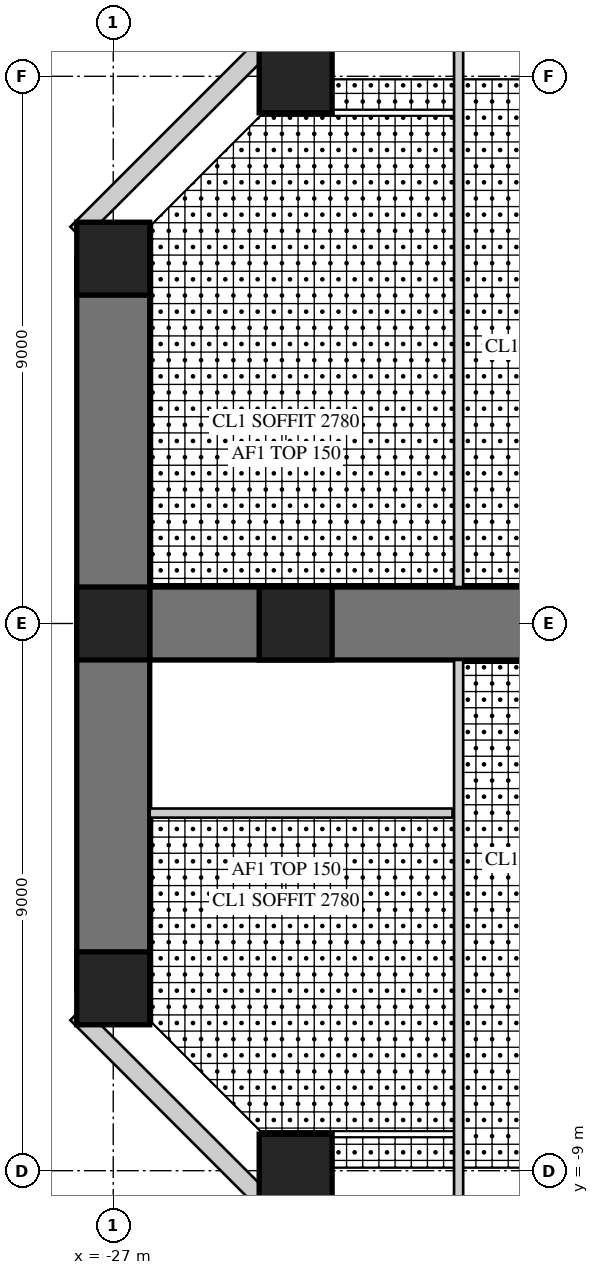
"""IFC4 building model, lengths in metres.
Left out: names, types, materials, properties, quantities, classifications, styles, units other than length and angle.
Written with IfcOpenShell. Run it as: python <this file> out.ifc"""

import sys

from ifc_helpers import new_model, si_unit, direction, frame, frame_2d, origin, origin_2d, place, context, subcontext, project, spatial, rectangle, hollow_rectangle, extrude, element, fill, save


model = new_model("IFC4")
c1 = context("Model", 3, precision=1e-05, world=origin(), true_north=direction((0.0, 1.0)))
c2 = subcontext(c1, "Body", "Model", "MODEL_VIEW")
j1 = project(units=[si_unit("LENGTHUNIT", "METRE"), si_unit("PLANEANGLEUNIT", "RADIAN")], contexts=[c1])
p1 = place(None, origin())
s1 = spatial("IfcSite", under=j1, at=p1, CompositionType="ELEMENT")
p2 = place(p1, origin())
s2 = spatial("IfcBuilding", under=s1, at=p2, CompositionType="ELEMENT")
p3 = place(p2, frame((0.0, 0.0, 47.5)))
s3 = spatial("IfcBuildingStorey", under=s2, at=p3, CompositionType="ELEMENT", Elevation=47.5)
p4 = place(p3, frame((-9.0, 0.0, 0.0), z_axis=(0.0, 0.0, 1.0), x_axis=(-1.0, 0.0, 0.0)))
e1 = element("IfcWall", 1, at=p4, inside=s3, PredefinedType="SHEAR", context=c2, shape_type="SweptSolid", body=[
    extrude(rectangle(XDim=18.0, YDim=1.2, at=frame_2d((9.0, 0.0))), origin(), (0.0, 0.0, 1.0), 4.0),
])
p5 = place(p4, frame((9.9, 0.0, 0.0)))
e2 = element("IfcOpeningElement", 2, at=p5, cuts=e1, PredefinedType="OPENING", context=c2, shape_type="SweptSolid", body=[
    extrude(rectangle(XDim=1.0, YDim=2.2, at=frame_2d((0.5, 1.1))), frame((0.0, 0.61, 0.0), z_axis=(0.0, -1.0, 0.0), x_axis=(1.0, 0.0, 0.0)), (0.0, 0.0, 1.0), 1.22),
])
p6 = place(p3, frame((-27.0, 6.0, 0.0), z_axis=(0.0, 0.0, 1.0), x_axis=(0.0, -1.0, 0.0)))
e3 = element("IfcWall", 3, at=p6, inside=s3, PredefinedType="SHEAR", context=c2, shape_type="SweptSolid", body=[
    extrude(rectangle(XDim=12.0, YDim=1.2, at=frame_2d((6.0, 0.0))), origin(), (0.0, 0.0, 1.0), 4.0),
])
p7 = place(p6, frame((1.6, 0.0, 0.6)))
e4 = element("IfcOpeningElement", 4, at=p7, cuts=e3, PredefinedType="OPENING", context=c2, shape_type="SweptSolid", body=[
    extrude(rectangle(XDim=3.0, YDim=2.4, at=frame_2d((1.5, 1.2))), frame((0.0, 0.61, 0.0), z_axis=(0.0, -1.0, 0.0), x_axis=(1.0, 0.0, 0.0)), (0.0, 0.0, 1.0), 1.22),
])
p8 = place(p6, frame((7.4, 0.0, 0.6)))
e5 = element("IfcOpeningElement", 5, at=p8, cuts=e3, PredefinedType="OPENING", context=c2, shape_type="SweptSolid", body=[
    extrude(rectangle(XDim=3.0, YDim=2.4, at=frame_2d((1.5, 1.2))), frame((0.0, 0.61, 0.0), z_axis=(0.0, -1.0, 0.0), x_axis=(1.0, 0.0, 0.0)), (0.0, 0.0, 1.0), 1.22),
])
for number, where, z_axis, x_axis in (
    (6, (-24.0, 9.0, 0.0), (0.0, 0.0, 1.0), (1.0, 0.0, 0.0)),
    (7, (-24.0, -9.0, 0.0), (0.0, 0.0, 1.0), (1.0, 0.0, 0.0)),
    (8, (-27.0, 6.0, 0.0), (0.0, 0.0, 1.0), (1.0, 0.0, 0.0)),
    (9, (-27.0, 0.0, 0.0), (0.0, 0.0, 1.0), (1.0, 0.0, 0.0)),
    (10, (-27.0, -6.0, 0.0), (0.0, 0.0, 1.0), (1.0, 0.0, 0.0)),
    (11, (-24.0, 0.0, 0.0), (0.0, 0.0, 1.0), (1.0, 0.0, 0.0)),
):
    element("IfcColumn", number, at=place(p3, frame(where, z_axis=z_axis, x_axis=x_axis)), inside=s3, PredefinedType="COLUMN", context=c2, shape_type="SweptSolid", body=[
        extrude(rectangle(XDim=1.2, YDim=1.2, at=origin_2d()), origin(), (0.0, 0.0, 1.0), 4.0),
    ])
p9 = place(p3, frame((-24.298, 9.72, 0.0), z_axis=(0.0, 0.0, 1.0), x_axis=(-0.707106781187, -0.707106781187, 0.0)))
e12 = element("IfcWall", 12, at=p9, inside=s3, PredefinedType="SOLIDWALL", context=c2, shape_type="SweptSolid", body=[
    extrude(rectangle(XDim=4.669, YDim=0.3, at=frame_2d((2.335, 0.0))), origin(), (0.0, 0.0, 1.0), 3.8),
])
p10 = place(p9, frame((1.885, 0.0, 0.3)))
e13 = element("IfcOpeningElement", 13, at=p10, cuts=e12, PredefinedType="OPENING", context=c2, shape_type="SweptSolid", body=[
    extrude(rectangle(XDim=0.9, YDim=2.4, at=frame_2d((0.45, 1.2))), frame((0.0, 0.16, 0.0), z_axis=(0.0, -1.0, 0.0), x_axis=(1.0, 0.0, 0.0)), (0.0, 0.0, 1.0), 0.32),
])
p11 = place(p3, frame((-27.6, -6.418, 0.0), z_axis=(0.0, 0.0, 1.0), x_axis=(0.707106781187, -0.707106781187, 0.0)))
e14 = element("IfcWall", 14, at=p11, inside=s3, PredefinedType="SOLIDWALL", context=c2, shape_type="SweptSolid", body=[
    extrude(rectangle(XDim=4.669, YDim=0.3, at=frame_2d((2.335, 0.0))), origin(), (0.0, 0.0, 1.0), 3.8),
])
p12 = place(p11, frame((1.885, 0.0, 0.3)))
e15 = element("IfcOpeningElement", 15, at=p12, cuts=e14, PredefinedType="OPENING", context=c2, shape_type="SweptSolid", body=[
    extrude(rectangle(XDim=0.9, YDim=2.4, at=frame_2d((0.45, 1.2))), frame((0.0, 0.16, 0.0), z_axis=(0.0, -1.0, 0.0), x_axis=(1.0, 0.0, 0.0)), (0.0, 0.0, 1.0), 0.32),
])
p13 = place(p3, frame((-21.42, -3.118, 0.0), z_axis=(0.0, 0.0, 1.0), x_axis=(-1.0, 0.0, 0.0)))
e16 = element("IfcWall", 16, at=p13, inside=s3, PredefinedType="PARTITIONING", context=c2, shape_type="SweptSolid", body=[
    extrude(rectangle(XDim=4.98, YDim=0.15, at=frame_2d((2.49, 0.0))), origin(), (0.0, 0.0, 1.0), 3.8),
])
p14 = place(p3, frame((-21.32, -0.6, 0.0), z_axis=(0.0, 0.0, 1.0), x_axis=(0.0, -1.0, 0.0)))
e17 = element("IfcWall", 17, at=p14, inside=s3, PredefinedType="PARTITIONING", context=c2, shape_type="SweptSolid", body=[
    extrude(rectangle(XDim=9.08, YDim=0.15, at=frame_2d((4.54, 0.0))), origin(), (0.0, 0.0, 1.0), 3.8),
])
p15 = place(p14, frame((0.35, 0.0, 0.0)))
e18 = element("IfcOpeningElement", 18, at=p15, cuts=e17, PredefinedType="OPENING", context=c2, shape_type="SweptSolid", body=[
    extrude(rectangle(XDim=1.0, YDim=2.2, at=frame_2d((0.5, 1.1))), frame((0.0, 0.085, 0.0), z_axis=(0.0, -1.0, 0.0), x_axis=(1.0, 0.0, 0.0)), (0.0, 0.0, 1.0), 0.17),
])
p16 = place(p14, frame((2.993, 0.0, 0.0)))
e19 = element("IfcOpeningElement", 19, at=p16, cuts=e17, PredefinedType="OPENING", context=c2, shape_type="SweptSolid", body=[
    extrude(rectangle(XDim=1.0, YDim=2.2, at=frame_2d((0.5, 1.1))), frame((0.0, 0.085, 0.0), z_axis=(0.0, -1.0, 0.0), x_axis=(1.0, 0.0, 0.0)), (0.0, 0.0, 1.0), 0.17),
])
p17 = place(p3, frame((-21.32, 9.68, 0.0), z_axis=(0.0, 0.0, 1.0), x_axis=(0.0, -1.0, 0.0)))
e20 = element("IfcWall", 20, at=p17, inside=s3, PredefinedType="PARTITIONING", context=c2, shape_type="SweptSolid", body=[
    extrude(rectangle(XDim=9.08, YDim=0.15, at=frame_2d((4.54, 0.0))), origin(), (0.0, 0.0, 1.0), 3.8),
])
p18 = place(p17, frame((7.63, 0.0, 0.0)))
e21 = element("IfcOpeningElement", 21, at=p18, cuts=e20, PredefinedType="OPENING", context=c2, shape_type="SweptSolid", body=[
    extrude(rectangle(XDim=1.0, YDim=2.2, at=frame_2d((0.5, 1.1))), frame((0.0, 0.085, 0.0), z_axis=(0.0, -1.0, 0.0), x_axis=(1.0, 0.0, 0.0)), (0.0, 0.0, 1.0), 0.17),
])
p19 = place(p10, origin())
e22 = element("IfcWindow", 22, at=p19, inside=s3, PartitioningType="SINGLE_PANEL", PredefinedType="WINDOW", context=c2, shape_type="SweptSolid", body=[
    extrude(hollow_rectangle(XDim=0.9, YDim=2.4, WallThickness=0.06, at=frame_2d((0.45, 1.2))), frame((0.0, 0.03, 0.0), z_axis=(0.0, -1.0, 0.0), x_axis=(1.0, 0.0, 0.0)), (0.0, 0.0, 1.0), 0.06),
    extrude(rectangle(XDim=0.779, YDim=2.279, at=frame_2d((0.45, 1.2))), frame((0.0, 0.03, 0.0), z_axis=(0.0, -1.0, 0.0), x_axis=(1.0, 0.0, 0.0)), (0.0, 0.0, 1.0), 0.06),
])
fill(e13, e22)
p20 = place(p7, origin())
e23 = element("IfcWindow", 23, at=p20, inside=s3, PartitioningType="SINGLE_PANEL", PredefinedType="WINDOW", context=c2, shape_type="SweptSolid", body=[
    extrude(hollow_rectangle(XDim=3.0, YDim=2.4, WallThickness=0.06, at=frame_2d((1.5, 1.2))), frame((0.0, 0.03, 0.0), z_axis=(0.0, -1.0, 0.0), x_axis=(1.0, 0.0, 0.0)), (0.0, 0.0, 1.0), 0.06),
    extrude(rectangle(XDim=2.879, YDim=2.279, at=frame_2d((1.5, 1.2))), frame((0.0, 0.03, 0.0), z_axis=(0.0, -1.0, 0.0), x_axis=(1.0, 0.0, 0.0)), (0.0, 0.0, 1.0), 0.06),
])
fill(e4, e23)
p21 = place(p8, origin())
e24 = element("IfcWindow", 24, at=p21, inside=s3, PartitioningType="SINGLE_PANEL", PredefinedType="WINDOW", context=c2, shape_type="SweptSolid", body=[
    extrude(hollow_rectangle(XDim=3.0, YDim=2.4, WallThickness=0.06, at=frame_2d((1.5, 1.2))), frame((0.0, 0.03, 0.0), z_axis=(0.0, -1.0, 0.0), x_axis=(1.0, 0.0, 0.0)), (0.0, 0.0, 1.0), 0.06),
    extrude(rectangle(XDim=2.879, YDim=2.279, at=frame_2d((1.5, 1.2))), frame((0.0, 0.03, 0.0), z_axis=(0.0, -1.0, 0.0), x_axis=(1.0, 0.0, 0.0)), (0.0, 0.0, 1.0), 0.06),
])
fill(e5, e24)
p22 = place(p12, origin())
e25 = element("IfcWindow", 25, at=p22, inside=s3, PartitioningType="SINGLE_PANEL", PredefinedType="WINDOW", context=c2, shape_type="SweptSolid", body=[
    extrude(hollow_rectangle(XDim=0.9, YDim=2.4, WallThickness=0.06, at=frame_2d((0.45, 1.2))), frame((0.0, 0.03, 0.0), z_axis=(0.0, -1.0, 0.0), x_axis=(1.0, 0.0, 0.0)), (0.0, 0.0, 1.0), 0.06),
    extrude(rectangle(XDim=0.779, YDim=2.279, at=frame_2d((0.45, 1.2))), frame((0.0, 0.03, 0.0), z_axis=(0.0, -1.0, 0.0), x_axis=(1.0, 0.0, 0.0)), (0.0, 0.0, 1.0), 0.06),
])
fill(e15, e25)
p23 = place(p15, frame((1.0, 0.0, 0.0), z_axis=(0.0, 0.0, 1.0), x_axis=(-1.0, 0.0, 0.0)))
e26 = element("IfcDoor", 26, at=p23, inside=s3, OperationType="SINGLE_SWING_RIGHT", PredefinedType="DOOR", context=c2, shape_type="SweptSolid", body=[
    extrude(rectangle(XDim=1.0, YDim=2.2, at=frame_2d((0.5, 1.1))), frame((0.0, 0.025, 0.0), z_axis=(0.0, -1.0, 0.0), x_axis=(1.0, 0.0, 0.0)), (0.0, 0.0, 1.0), 0.05),
])
fill(e18, e26)
p24 = place(p16, frame((1.0, 0.0, 0.0), z_axis=(0.0, 0.0, 1.0), x_axis=(-1.0, 0.0, 0.0)))
e27 = element("IfcDoor", 27, at=p24, inside=s3, OperationType="SINGLE_SWING_RIGHT", PredefinedType="DOOR", context=c2, shape_type="SweptSolid", body=[
    extrude(rectangle(XDim=1.0, YDim=2.2, at=frame_2d((0.5, 1.1))), frame((0.0, 0.025, 0.0), z_axis=(0.0, -1.0, 0.0), x_axis=(1.0, 0.0, 0.0)), (0.0, 0.0, 1.0), 0.05),
])
fill(e19, e27)
p25 = place(p18, frame((1.0, 0.0, 0.0), z_axis=(0.0, 0.0, 1.0), x_axis=(-1.0, 0.0, 0.0)))
e28 = element("IfcDoor", 28, at=p25, inside=s3, OperationType="SINGLE_SWING_LEFT", PredefinedType="DOOR", context=c2, shape_type="SweptSolid", body=[
    extrude(rectangle(XDim=1.0, YDim=2.2, at=frame_2d((0.5, 1.1))), frame((0.0, 0.025, 0.0), z_axis=(0.0, -1.0, 0.0), x_axis=(1.0, 0.0, 0.0)), (0.0, 0.0, 1.0), 0.05),
])
fill(e21, e28)
save(model, sys.argv[1])
